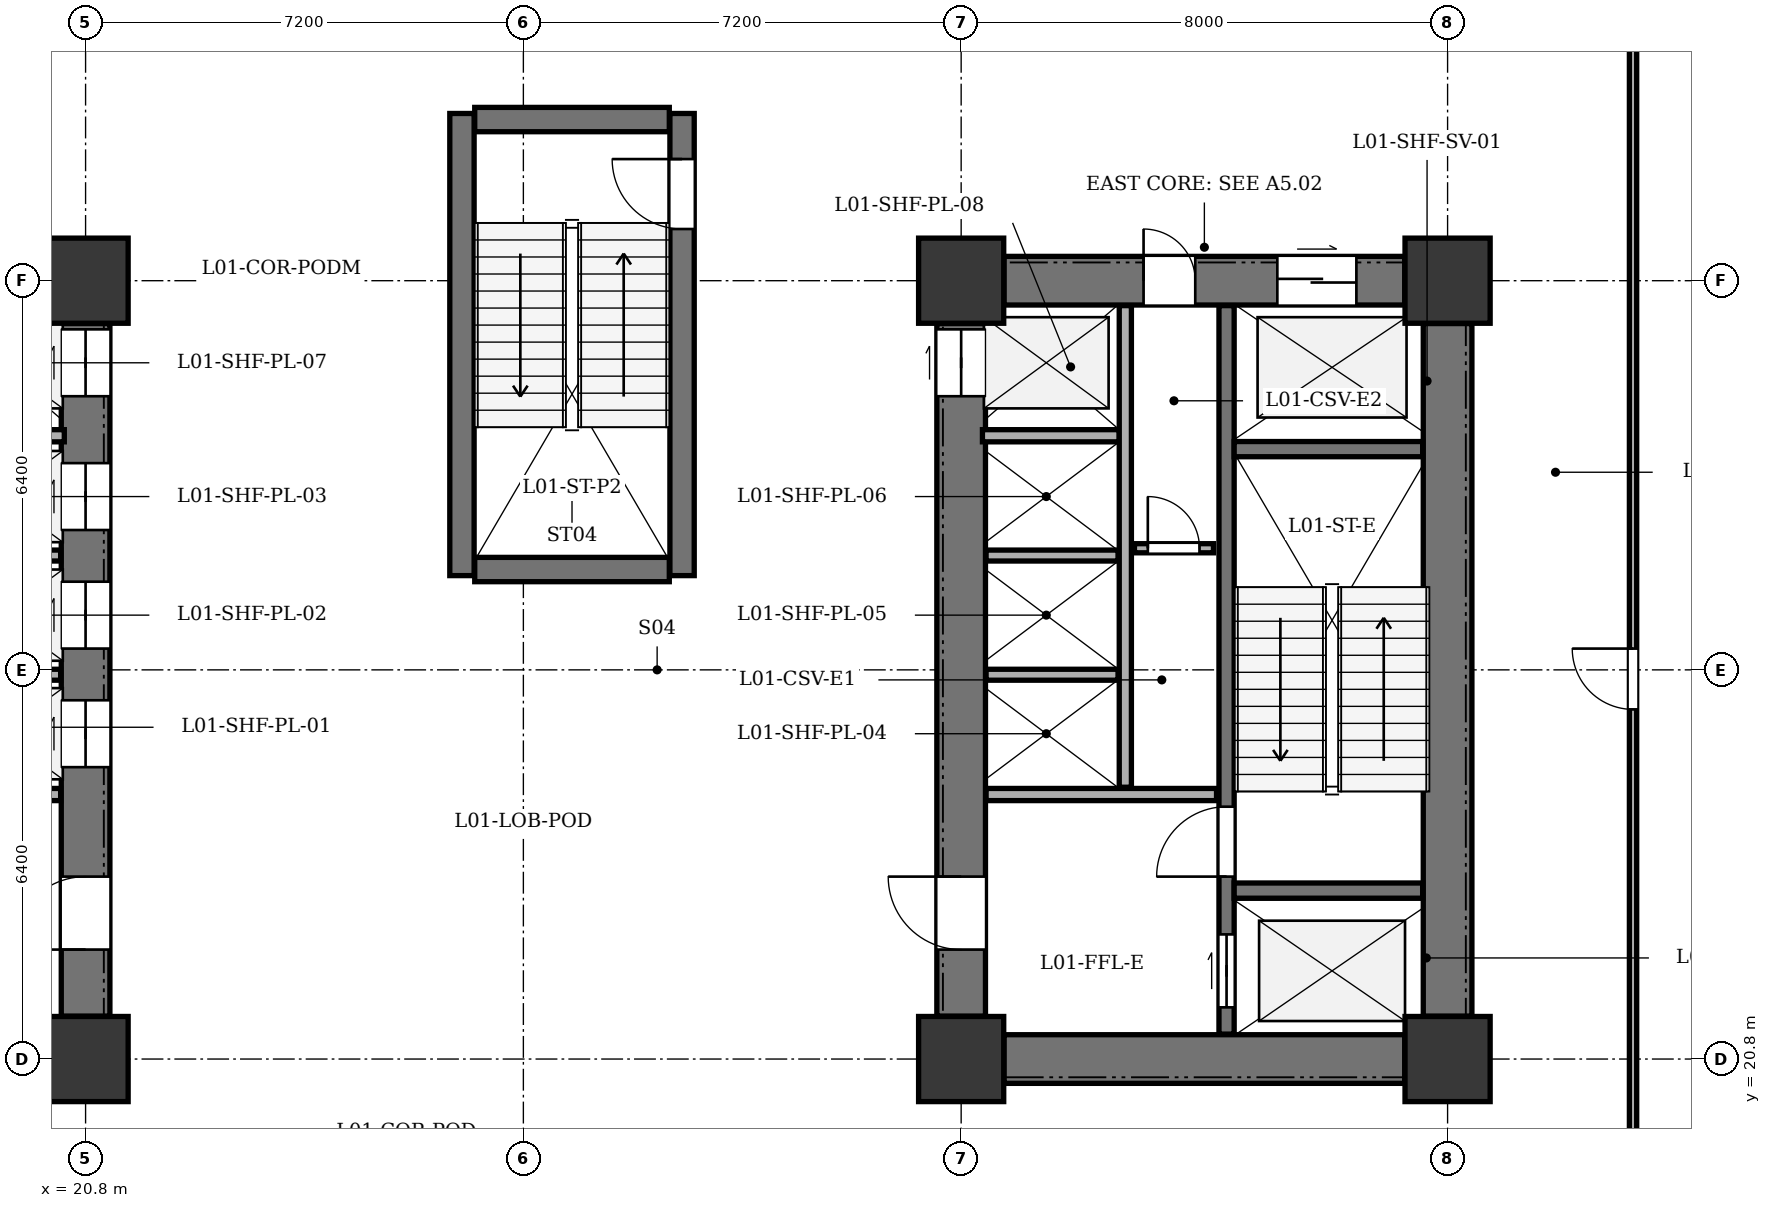
"""IFC4 building model, lengths in metres.
Left out: names, types, materials, properties, quantities, classifications, styles, units other than length and angle.
Written with IfcOpenShell. Run it as: python <this file> out.ifc"""

import sys

from ifc_helpers import new_model, si_unit, direction, frame, frame_2d, origin, origin_2d, place, context, subcontext, project, spatial, rectangle, extrude, element, fill, save


model = new_model("IFC4")
c1 = context("Model", 3, precision=1e-05, world=origin(), true_north=direction((0.0, 1.0)))
c2 = subcontext(c1, "Body", "Model", "MODEL_VIEW")
j1 = project(units=[si_unit("LENGTHUNIT", "METRE"), si_unit("PLANEANGLEUNIT", "RADIAN")], contexts=[c1])
p1 = place(None, origin())
s1 = spatial("IfcSite", under=j1, at=p1, CompositionType="ELEMENT")
p2 = place(p1, origin())
s2 = spatial("IfcBuilding", under=s1, at=p2, CompositionType="ELEMENT")
p3 = place(p2, frame((0.0, 0.0, 5.4)))
s3 = spatial("IfcBuildingStorey", under=s2, at=p3, CompositionType="ELEMENT", Elevation=5.4)
for number, where, z_axis, x_axis in (
    (1, (20.8, 20.8, 0.0), (0.0, 0.0, 1.0), (1.0, 0.0, 0.0)),
    (2, (20.8, 33.6, 0.0), (0.0, 0.0, 1.0), (1.0, 0.0, 0.0)),
    (3, (35.2, 20.8, 0.0), (0.0, 0.0, 1.0), (1.0, 0.0, 0.0)),
    (4, (43.2, 20.8, 0.0), (0.0, 0.0, 1.0), (1.0, 0.0, 0.0)),
    (5, (35.2, 33.6, 0.0), (0.0, 0.0, 1.0), (1.0, 0.0, 0.0)),
    (6, (43.2, 33.6, 0.0), (0.0, 0.0, 1.0), (1.0, 0.0, 0.0)),
):
    element("IfcColumn", number, at=place(p3, frame(where, z_axis=z_axis, x_axis=x_axis)), inside=s3, PredefinedType="COLUMN", context=c2, shape_type="SweptSolid", body=[
        extrude(rectangle(XDim=1.4, YDim=1.4, at=origin_2d()), origin(), (0.0, 0.0, 1.0), 4.5),
    ])
p4 = place(p3, frame((20.8, 21.505, 0.0), z_axis=(0.0, 0.0, 1.0), x_axis=(0.0, 1.0, 0.0)))
e7 = element("IfcWall", 7, at=p4, inside=s3, PredefinedType="SHEAR", context=c2, shape_type="SweptSolid", body=[
    extrude(rectangle(XDim=11.39, YDim=0.8, at=frame_2d((5.695, 0.0))), origin(), (0.0, 0.0, 1.0), 4.18),
])
p5 = place(p4, frame((1.095, 0.0, 0.0)))
e8 = element("IfcOpeningElement", 8, at=p5, cuts=e7, PredefinedType="OPENING", context=c2, shape_type="SweptSolid", body=[
    extrude(rectangle(XDim=1.2, YDim=2.15, at=frame_2d((0.6, 1.075))), frame((0.0, 0.41, 0.0), z_axis=(0.0, -1.0, 0.0), x_axis=(1.0, 0.0, 0.0)), (0.0, 0.0, 1.0), 0.82),
])
p6 = place(p4, frame((4.095, 0.0, 0.0)))
e9 = element("IfcOpeningElement", 9, at=p6, cuts=e7, PredefinedType="OPENING", context=c2, shape_type="SweptSolid", body=[
    extrude(rectangle(XDim=1.1, YDim=2.1, at=frame_2d((0.55, 1.05))), frame((0.0, 0.41, 0.0), z_axis=(0.0, -1.0, 0.0), x_axis=(1.0, 0.0, 0.0)), (0.0, 0.0, 1.0), 0.82),
])
p7 = place(p4, frame((6.045, 0.0, 0.0)))
e10 = element("IfcOpeningElement", 10, at=p7, cuts=e7, PredefinedType="OPENING", context=c2, shape_type="SweptSolid", body=[
    extrude(rectangle(XDim=1.1, YDim=2.1, at=frame_2d((0.55, 1.05))), frame((0.0, 0.41, 0.0), z_axis=(0.0, -1.0, 0.0), x_axis=(1.0, 0.0, 0.0)), (0.0, 0.0, 1.0), 0.82),
])
p8 = place(p4, frame((7.995, 0.0, 0.0)))
e11 = element("IfcOpeningElement", 11, at=p8, cuts=e7, PredefinedType="OPENING", context=c2, shape_type="SweptSolid", body=[
    extrude(rectangle(XDim=1.1, YDim=2.1, at=frame_2d((0.55, 1.05))), frame((0.0, 0.41, 0.0), z_axis=(0.0, -1.0, 0.0), x_axis=(1.0, 0.0, 0.0)), (0.0, 0.0, 1.0), 0.82),
])
p9 = place(p4, frame((10.195, 0.0, 0.0)))
e12 = element("IfcOpeningElement", 12, at=p9, cuts=e7, PredefinedType="OPENING", context=c2, shape_type="SweptSolid", body=[
    extrude(rectangle(XDim=1.1, YDim=2.1, at=frame_2d((0.55, 1.05))), frame((0.0, 0.41, 0.0), z_axis=(0.0, -1.0, 0.0), x_axis=(1.0, 0.0, 0.0)), (0.0, 0.0, 1.0), 0.82),
])
p10 = place(p3, frame((16.6, 25.15, 0.0), z_axis=(0.0, 0.0, 1.0), x_axis=(1.0, 0.0, 0.0)))
e13 = element("IfcWall", 13, at=p10, inside=s3, PredefinedType="SOLIDWALL", context=c2, shape_type="SweptSolid", body=[
    extrude(rectangle(XDim=3.79, YDim=0.2, at=frame_2d((1.895, 0.0))), origin(), (0.0, 0.0, 1.0), 4.18),
])
p11 = place(p10, frame((0.3, 0.0, 0.0)))
e14 = element("IfcOpeningElement", 14, at=p11, cuts=e13, PredefinedType="OPENING", context=c2, shape_type="SweptSolid", body=[
    extrude(rectangle(XDim=0.85, YDim=2.02, at=frame_2d((0.425, 1.01))), frame((0.0, 0.11, 0.0), z_axis=(0.0, -1.0, 0.0), x_axis=(1.0, 0.0, 0.0)), (0.0, 0.0, 1.0), 0.22),
])
p12 = place(p3, frame((16.6, 31.05, 0.0), z_axis=(0.0, 0.0, 1.0), x_axis=(1.0, 0.0, 0.0)))
e15 = element("IfcWall", 15, at=p12, inside=s3, PredefinedType="SOLIDWALL", context=c2, shape_type="SweptSolid", body=[
    extrude(rectangle(XDim=3.85, YDim=0.2, at=frame_2d((1.925, 0.0))), origin(), (0.0, 0.0, 1.0), 4.18),
])
for number, where, z_axis, x_axis in (
    (16, (18.22, 27.12, 0.0), (0.0, 0.0, 1.0), (1.0, 0.0, 0.0)),
    (17, (18.22, 29.08, 0.0), (0.0, 0.0, 1.0), (1.0, 0.0, 0.0)),
):
    element("IfcWall", number, at=place(p3, frame(where, z_axis=z_axis, x_axis=x_axis)), inside=s3, PredefinedType="PARTITIONING", context=c2, shape_type="SweptSolid", body=[
        extrude(rectangle(XDim=2.17, YDim=0.18, at=frame_2d((1.085, 0.0))), origin(), (0.0, 0.0, 1.0), 4.18),
    ])
p13 = place(p3, frame((43.2, 21.505, 0.0), z_axis=(0.0, 0.0, 1.0), x_axis=(0.0, 1.0, 0.0)))
e18 = element("IfcWall", 18, at=p13, inside=s3, PredefinedType="SHEAR", context=c2, shape_type="SweptSolid", body=[
    extrude(rectangle(XDim=11.39, YDim=0.8, at=frame_2d((5.695, 0.0))), origin(), (0.0, 0.0, 1.0), 4.18),
])
p14 = place(p3, frame((35.905, 20.8, 0.0), z_axis=(0.0, 0.0, 1.0), x_axis=(1.0, 0.0, 0.0)))
e19 = element("IfcWall", 19, at=p14, inside=s3, PredefinedType="SHEAR", context=c2, shape_type="SweptSolid", body=[
    extrude(rectangle(XDim=6.59, YDim=0.8, at=frame_2d((3.295, 0.0))), origin(), (0.0, 0.0, 1.0), 4.18),
])
p15 = place(p3, frame((35.905, 33.6, 0.0), z_axis=(0.0, 0.0, 1.0), x_axis=(1.0, 0.0, 0.0)))
e20 = element("IfcWall", 20, at=p15, inside=s3, PredefinedType="SHEAR", context=c2, shape_type="SweptSolid", body=[
    extrude(rectangle(XDim=6.59, YDim=0.8, at=frame_2d((3.295, 0.0))), origin(), (0.0, 0.0, 1.0), 4.18),
])
p16 = place(p15, frame((4.495, 0.0, 0.0)))
e21 = element("IfcOpeningElement", 21, at=p16, cuts=e20, PredefinedType="OPENING", context=c2, shape_type="SweptSolid", body=[
    extrude(rectangle(XDim=1.3, YDim=2.15, at=frame_2d((0.65, 1.075))), frame((0.0, 0.41, 0.0), z_axis=(0.0, -1.0, 0.0), x_axis=(1.0, 0.0, 0.0)), (0.0, 0.0, 1.0), 0.82),
])
p17 = place(p15, frame((2.295, 0.0, 0.0)))
e22 = element("IfcOpeningElement", 22, at=p17, cuts=e20, PredefinedType="OPENING", context=c2, shape_type="SweptSolid", body=[
    extrude(rectangle(XDim=0.85, YDim=2.02, at=frame_2d((0.425, 1.01))), frame((0.0, 0.41, 0.0), z_axis=(0.0, -1.0, 0.0), x_axis=(1.0, 0.0, 0.0)), (0.0, 0.0, 1.0), 0.82),
])
p18 = place(p3, frame((35.2, 21.505, 0.0), z_axis=(0.0, 0.0, 1.0), x_axis=(0.0, 1.0, 0.0)))
e23 = element("IfcWall", 23, at=p18, inside=s3, PredefinedType="SHEAR", context=c2, shape_type="SweptSolid", body=[
    extrude(rectangle(XDim=11.39, YDim=0.8, at=frame_2d((5.695, 0.0))), origin(), (0.0, 0.0, 1.0), 4.18),
])
p19 = place(p18, frame((1.095, 0.0, 0.0)))
e24 = element("IfcOpeningElement", 24, at=p19, cuts=e23, PredefinedType="OPENING", context=c2, shape_type="SweptSolid", body=[
    extrude(rectangle(XDim=1.2, YDim=2.15, at=frame_2d((0.6, 1.075))), frame((0.0, 0.41, 0.0), z_axis=(0.0, -1.0, 0.0), x_axis=(1.0, 0.0, 0.0)), (0.0, 0.0, 1.0), 0.82),
])
p20 = place(p18, frame((10.195, 0.0, 0.0)))
e25 = element("IfcOpeningElement", 25, at=p20, cuts=e23, PredefinedType="OPENING", context=c2, shape_type="SweptSolid", body=[
    extrude(rectangle(XDim=1.1, YDim=2.1, at=frame_2d((0.55, 1.05))), frame((0.0, 0.41, 0.0), z_axis=(0.0, -1.0, 0.0), x_axis=(1.0, 0.0, 0.0)), (0.0, 0.0, 1.0), 0.82),
])
p21 = place(p3, frame((39.565, 21.21, 0.0), z_axis=(0.0, 0.0, 1.0), x_axis=(0.0, 1.0, 0.0)))
e26 = element("IfcWall", 26, at=p21, inside=s3, PredefinedType="SHEAR", context=c2, shape_type="SweptSolid", body=[
    extrude(rectangle(XDim=11.98, YDim=0.25, at=frame_2d((5.99, 0.0))), origin(), (0.0, 0.0, 1.0), 4.18),
])
p22 = place(p21, frame((0.44, 0.0, 0.0)))
e27 = element("IfcOpeningElement", 27, at=p22, cuts=e26, PredefinedType="OPENING", context=c2, shape_type="SweptSolid", body=[
    extrude(rectangle(XDim=1.2, YDim=2.15, at=frame_2d((0.6, 1.075))), frame((0.0, 0.135, 0.0), z_axis=(0.0, -1.0, 0.0), x_axis=(1.0, 0.0, 0.0)), (0.0, 0.0, 1.0), 0.27),
])
p23 = place(p21, frame((2.59, 0.0, 0.0)))
e28 = element("IfcOpeningElement", 28, at=p23, cuts=e26, PredefinedType="OPENING", context=c2, shape_type="SweptSolid", body=[
    extrude(rectangle(XDim=1.15, YDim=2.15, at=frame_2d((0.575, 1.075))), frame((0.0, 0.135, 0.0), z_axis=(0.0, -1.0, 0.0), x_axis=(1.0, 0.0, 0.0)), (0.0, 0.0, 1.0), 0.27),
])
for number, where, z_axis, x_axis in (
    (29, (39.69, 23.57, 0.0), (0.0, 0.0, 1.0), (1.0, 0.0, 0.0)),
    (30, (39.69, 30.83, 0.0), (0.0, 0.0, 1.0), (1.0, 0.0, 0.0)),
):
    element("IfcWall", number, at=place(p3, frame(where, z_axis=z_axis, x_axis=x_axis)), inside=s3, PredefinedType="SHEAR", context=c2, shape_type="SweptSolid", body=[
        extrude(rectangle(XDim=3.1, YDim=0.25, at=frame_2d((1.55, 0.0))), origin(), (0.0, 0.0, 1.0), 4.18),
    ])
p24 = place(p3, frame((35.61, 25.15, 0.0), z_axis=(0.0, 0.0, 1.0), x_axis=(1.0, 0.0, 0.0)))
e31 = element("IfcWall", 31, at=p24, inside=s3, PredefinedType="SOLIDWALL", context=c2, shape_type="SweptSolid", body=[
    extrude(rectangle(XDim=3.79, YDim=0.2, at=frame_2d((1.895, 0.0))), origin(), (0.0, 0.0, 1.0), 4.18),
])
p25 = place(p3, frame((35.55, 31.05, 0.0), z_axis=(0.0, 0.0, 1.0), x_axis=(1.0, 0.0, 0.0)))
e32 = element("IfcWall", 32, at=p25, inside=s3, PredefinedType="SOLIDWALL", context=c2, shape_type="SweptSolid", body=[
    extrude(rectangle(XDim=2.25, YDim=0.2, at=frame_2d((1.125, 0.0))), origin(), (0.0, 0.0, 1.0), 4.18),
])
p26 = place(p3, frame((37.9, 25.27, 0.0), z_axis=(0.0, 0.0, 1.0), x_axis=(0.0, 1.0, 0.0)))
e33 = element("IfcWall", 33, at=p26, inside=s3, PredefinedType="SOLIDWALL", context=c2, shape_type="SweptSolid", body=[
    extrude(rectangle(XDim=7.92, YDim=0.2, at=frame_2d((3.96, 0.0))), origin(), (0.0, 0.0, 1.0), 4.18),
])
for number, where, z_axis, x_axis in (
    (34, (35.61, 27.12, 0.0), (0.0, 0.0, 1.0), (1.0, 0.0, 0.0)),
    (35, (35.61, 29.08, 0.0), (0.0, 0.0, 1.0), (1.0, 0.0, 0.0)),
):
    element("IfcWall", number, at=place(p3, frame(where, z_axis=z_axis, x_axis=x_axis)), inside=s3, PredefinedType="PARTITIONING", context=c2, shape_type="SweptSolid", body=[
        extrude(rectangle(XDim=2.17, YDim=0.18, at=frame_2d((1.085, 0.0))), origin(), (0.0, 0.0, 1.0), 4.18),
    ])
p27 = place(p3, frame((26.99, 28.75, 0.0), z_axis=(0.0, 0.0, 1.0), x_axis=(0.0, 1.0, 0.0)))
e36 = element("IfcWall", 36, at=p27, inside=s3, PredefinedType="SHEAR", context=c2, shape_type="SweptSolid", body=[
    extrude(rectangle(XDim=7.6, YDim=0.4, at=frame_2d((3.8, 0.0))), origin(), (0.0, 0.0, 1.0), 4.18),
])
p28 = place(p3, frame((30.61, 28.75, 0.0), z_axis=(0.0, 0.0, 1.0), x_axis=(0.0, 1.0, 0.0)))
e37 = element("IfcWall", 37, at=p28, inside=s3, PredefinedType="SHEAR", context=c2, shape_type="SweptSolid", body=[
    extrude(rectangle(XDim=7.6, YDim=0.4, at=frame_2d((3.8, 0.0))), origin(), (0.0, 0.0, 1.0), 4.18),
])
p29 = place(p28, frame((5.7, 0.0, 0.0)))
e38 = element("IfcOpeningElement", 38, at=p29, cuts=e37, PredefinedType="OPENING", context=c2, shape_type="SweptSolid", body=[
    extrude(rectangle(XDim=1.15, YDim=2.15, at=frame_2d((0.575, 1.075))), frame((0.0, 0.21, 0.0), z_axis=(0.0, -1.0, 0.0), x_axis=(1.0, 0.0, 0.0)), (0.0, 0.0, 1.0), 0.42),
])
for number, where, z_axis, x_axis in (
    (39, (27.2, 28.85, 0.0), (0.0, 0.0, 1.0), (1.0, 0.0, 0.0)),
    (40, (27.2, 36.25, 0.0), (0.0, 0.0, 1.0), (1.0, 0.0, 0.0)),
):
    element("IfcWall", number, at=place(p3, frame(where, z_axis=z_axis, x_axis=x_axis)), inside=s3, PredefinedType="SHEAR", context=c2, shape_type="SweptSolid", body=[
        extrude(rectangle(XDim=3.2, YDim=0.4, at=frame_2d((1.6, 0.0))), origin(), (0.0, 0.0, 1.0), 4.18),
    ])
p30 = place(p3, frame((38.05, 29.2, 0.0), z_axis=(0.0, 0.0, 1.0), x_axis=(1.0, 0.0, 0.0)))
e41 = element("IfcWall", 41, at=p30, inside=s3, PredefinedType="PARTITIONING", context=c2, shape_type="SweptSolid", body=[
    extrude(rectangle(XDim=1.3, YDim=0.15, at=frame_2d((0.65, 0.0))), origin(), (0.0, 0.0, 1.0), 4.18),
])
p31 = place(p30, frame((0.22, 0.0, 0.0)))
e42 = element("IfcOpeningElement", 42, at=p31, cuts=e41, PredefinedType="OPENING", context=c2, shape_type="SweptSolid", body=[
    extrude(rectangle(XDim=0.85, YDim=2.02, at=frame_2d((0.425, 1.01))), frame((0.0, 0.085, 0.0), z_axis=(0.0, -1.0, 0.0), x_axis=(1.0, 0.0, 0.0)), (0.0, 0.0, 1.0), 0.17),
])
p32 = place(p3, frame((46.25, 18.565, 0.0), z_axis=(0.0, 0.0, 1.0), x_axis=(0.0, 1.0, 0.0)))
e43 = element("IfcWall", 43, at=p32, inside=s3, PredefinedType="PARTITIONING", context=c2, shape_type="SweptSolid", body=[
    extrude(rectangle(XDim=19.72, YDim=0.12, at=frame_2d((9.86, 0.0))), origin(), (0.0, 0.0, 1.0), 4.18),
])
p33 = place(p32, frame((7.985, 0.0, 0.0)))
e44 = element("IfcOpeningElement", 44, at=p33, cuts=e43, PredefinedType="OPENING", context=c2, shape_type="SweptSolid", body=[
    extrude(rectangle(XDim=1.0, YDim=2.1, at=frame_2d((0.5, 1.05))), frame((0.0, 0.07, 0.0), z_axis=(0.0, -1.0, 0.0), x_axis=(1.0, 0.0, 0.0)), (0.0, 0.0, 1.0), 0.14),
])
p34 = place(p5, origin())
e45 = element("IfcDoor", 45, at=p34, inside=s3, OperationType="SINGLE_SWING_LEFT", PredefinedType="DOOR", context=c2, shape_type="SweptSolid", body=[
    extrude(rectangle(XDim=1.2, YDim=2.15, at=frame_2d((0.6, 1.075))), frame((0.0, 0.025, 0.0), z_axis=(0.0, -1.0, 0.0), x_axis=(1.0, 0.0, 0.0)), (0.0, 0.0, 1.0), 0.05),
])
fill(e8, e45)
p35 = place(p6, origin())
e46 = element("IfcDoor", 46, at=p35, inside=s3, OperationType="DOUBLE_DOOR_SLIDING", PredefinedType="DOOR", context=c2, shape_type="SweptSolid", body=[
    extrude(rectangle(XDim=1.1, YDim=2.1, at=frame_2d((0.55, 1.05))), frame((0.0, 0.025, 0.0), z_axis=(0.0, -1.0, 0.0), x_axis=(1.0, 0.0, 0.0)), (0.0, 0.0, 1.0), 0.05),
])
fill(e9, e46)
p36 = place(p7, origin())
e47 = element("IfcDoor", 47, at=p36, inside=s3, OperationType="DOUBLE_DOOR_SLIDING", PredefinedType="DOOR", context=c2, shape_type="SweptSolid", body=[
    extrude(rectangle(XDim=1.1, YDim=2.1, at=frame_2d((0.55, 1.05))), frame((0.0, 0.025, 0.0), z_axis=(0.0, -1.0, 0.0), x_axis=(1.0, 0.0, 0.0)), (0.0, 0.0, 1.0), 0.05),
])
fill(e10, e47)
p37 = place(p8, origin())
e48 = element("IfcDoor", 48, at=p37, inside=s3, OperationType="DOUBLE_DOOR_SLIDING", PredefinedType="DOOR", context=c2, shape_type="SweptSolid", body=[
    extrude(rectangle(XDim=1.1, YDim=2.1, at=frame_2d((0.55, 1.05))), frame((0.0, 0.025, 0.0), z_axis=(0.0, -1.0, 0.0), x_axis=(1.0, 0.0, 0.0)), (0.0, 0.0, 1.0), 0.05),
])
fill(e11, e48)
p38 = place(p9, origin())
e49 = element("IfcDoor", 49, at=p38, inside=s3, OperationType="DOUBLE_DOOR_SLIDING", PredefinedType="DOOR", context=c2, shape_type="SweptSolid", body=[
    extrude(rectangle(XDim=1.1, YDim=2.1, at=frame_2d((0.55, 1.05))), frame((0.0, 0.025, 0.0), z_axis=(0.0, -1.0, 0.0), x_axis=(1.0, 0.0, 0.0)), (0.0, 0.0, 1.0), 0.05),
])
fill(e12, e49)
p39 = place(p16, origin())
e50 = element("IfcDoor", 50, at=p39, inside=s3, OperationType="DOUBLE_DOOR_SLIDING", PredefinedType="DOOR", context=c2, shape_type="SweptSolid", body=[
    extrude(rectangle(XDim=1.3, YDim=2.15, at=frame_2d((0.65, 1.075))), frame((0.0, 0.025, 0.0), z_axis=(0.0, -1.0, 0.0), x_axis=(1.0, 0.0, 0.0)), (0.0, 0.0, 1.0), 0.05),
])
fill(e21, e50)
p40 = place(p17, origin())
e51 = element("IfcDoor", 51, at=p40, inside=s3, OperationType="SINGLE_SWING_LEFT", PredefinedType="DOOR", context=c2, shape_type="SweptSolid", body=[
    extrude(rectangle(XDim=0.85, YDim=2.02, at=frame_2d((0.425, 1.01))), frame((0.0, 0.025, 0.0), z_axis=(0.0, -1.0, 0.0), x_axis=(1.0, 0.0, 0.0)), (0.0, 0.0, 1.0), 0.05),
])
fill(e22, e51)
p41 = place(p19, origin())
e52 = element("IfcDoor", 52, at=p41, inside=s3, OperationType="SINGLE_SWING_RIGHT", PredefinedType="DOOR", context=c2, shape_type="SweptSolid", body=[
    extrude(rectangle(XDim=1.2, YDim=2.15, at=frame_2d((0.6, 1.075))), frame((0.0, 0.025, 0.0), z_axis=(0.0, -1.0, 0.0), x_axis=(1.0, 0.0, 0.0)), (0.0, 0.0, 1.0), 0.05),
])
fill(e24, e52)
p42 = place(p20, origin())
e53 = element("IfcDoor", 53, at=p42, inside=s3, OperationType="DOUBLE_DOOR_SLIDING", PredefinedType="DOOR", context=c2, shape_type="SweptSolid", body=[
    extrude(rectangle(XDim=1.1, YDim=2.1, at=frame_2d((0.55, 1.05))), frame((0.0, 0.025, 0.0), z_axis=(0.0, -1.0, 0.0), x_axis=(1.0, 0.0, 0.0)), (0.0, 0.0, 1.0), 0.05),
])
fill(e25, e53)
p43 = place(p22, origin())
e54 = element("IfcDoor", 54, at=p43, inside=s3, OperationType="DOUBLE_DOOR_SLIDING", PredefinedType="DOOR", context=c2, shape_type="SweptSolid", body=[
    extrude(rectangle(XDim=1.2, YDim=2.15, at=frame_2d((0.6, 1.075))), frame((0.0, 0.025, 0.0), z_axis=(0.0, -1.0, 0.0), x_axis=(1.0, 0.0, 0.0)), (0.0, 0.0, 1.0), 0.05),
])
fill(e27, e54)
p44 = place(p23, origin())
e55 = element("IfcDoor", 55, at=p44, inside=s3, OperationType="SINGLE_SWING_LEFT", PredefinedType="DOOR", context=c2, shape_type="SweptSolid", body=[
    extrude(rectangle(XDim=1.15, YDim=2.15, at=frame_2d((0.575, 1.075))), frame((0.0, 0.025, 0.0), z_axis=(0.0, -1.0, 0.0), x_axis=(1.0, 0.0, 0.0)), (0.0, 0.0, 1.0), 0.05),
])
fill(e28, e55)
p45 = place(p29, origin())
e56 = element("IfcDoor", 56, at=p45, inside=s3, OperationType="SINGLE_SWING_RIGHT", PredefinedType="DOOR", context=c2, shape_type="SweptSolid", body=[
    extrude(rectangle(XDim=1.15, YDim=2.15, at=frame_2d((0.575, 1.075))), frame((0.0, 0.025, 0.0), z_axis=(0.0, -1.0, 0.0), x_axis=(1.0, 0.0, 0.0)), (0.0, 0.0, 1.0), 0.05),
])
fill(e38, e56)
p46 = place(p31, origin())
e57 = element("IfcDoor", 57, at=p46, inside=s3, OperationType="SINGLE_SWING_LEFT", PredefinedType="DOOR", context=c2, shape_type="SweptSolid", body=[
    extrude(rectangle(XDim=0.85, YDim=2.02, at=frame_2d((0.425, 1.01))), frame((0.0, 0.025, 0.0), z_axis=(0.0, -1.0, 0.0), x_axis=(1.0, 0.0, 0.0)), (0.0, 0.0, 1.0), 0.05),
])
fill(e42, e57)
p47 = place(p33, origin())
e58 = element("IfcDoor", 58, at=p47, inside=s3, OperationType="SINGLE_SWING_RIGHT", PredefinedType="DOOR", context=c2, shape_type="SweptSolid", body=[
    extrude(rectangle(XDim=1.0, YDim=2.1, at=frame_2d((0.5, 1.05))), frame((0.0, 0.025, 0.0), z_axis=(0.0, -1.0, 0.0), x_axis=(1.0, 0.0, 0.0)), (0.0, 0.0, 1.0), 0.05),
])
fill(e44, e58)
save(model, sys.argv[1])
